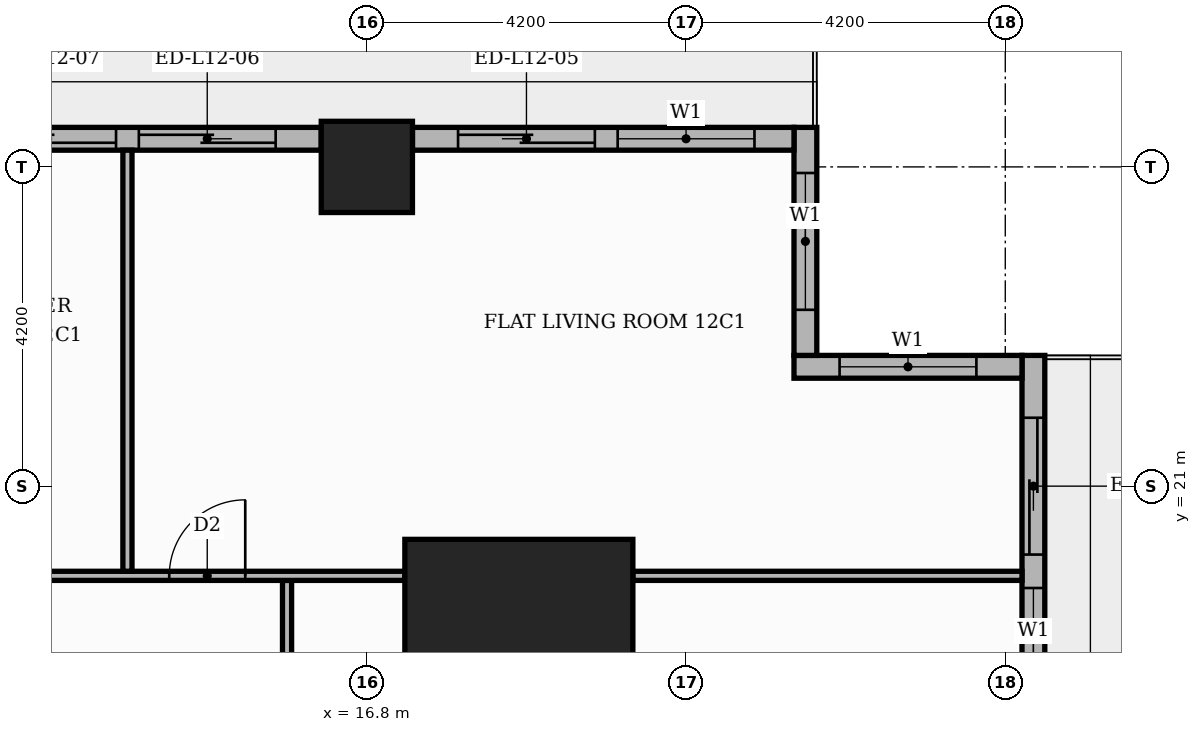
"""IFC4 building model, lengths in metres.
Left out: names, types, materials, properties, quantities, classifications, styles, units other than length and angle.
Written with IfcOpenShell. Run it as: python <this file> out.ifc"""

import sys

from ifc_helpers import new_model, si_unit, direction, frame, frame_2d, origin, origin_2d, place, context, subcontext, project, spatial, rectangle, extrude, element, fill, save


model = new_model("IFC4")
c1 = context("Model", 3, precision=1e-05, world=origin(), true_north=direction((0.0, 1.0)))
c2 = subcontext(c1, "Body", "Model", "MODEL_VIEW")
j1 = project(units=[si_unit("LENGTHUNIT", "METRE"), si_unit("PLANEANGLEUNIT", "RADIAN")], contexts=[c1])
p1 = place(None, origin())
s1 = spatial("IfcSite", under=j1, at=p1, CompositionType="ELEMENT")
p2 = place(p1, origin())
s2 = spatial("IfcBuilding", under=s1, at=p2, CompositionType="ELEMENT")
p3 = place(p2, frame((0.0, 0.0, 54.3)))
s3 = spatial("IfcBuildingStorey", under=s2, at=p3, CompositionType="ELEMENT", Elevation=54.3)
p4 = place(p3, frame((18.8, 18.8, 0.0), z_axis=(0.0, 0.0, 1.0), x_axis=(1.0, 0.0, 0.0)))
e1 = element("IfcColumn", 1, at=p4, inside=s3, PredefinedType="COLUMN", context=c2, shape_type="SweptSolid", body=[
    extrude(rectangle(XDim=3.0, YDim=3.0, at=origin_2d()), origin(), (0.0, 0.0, 1.0), 3.9),
])
p5 = place(p3, frame((16.8, 25.2, 0.0), z_axis=(0.0, 0.0, 1.0), x_axis=(1.0, 0.0, 0.0)))
e2 = element("IfcColumn", 2, at=p5, inside=s3, PredefinedType="COLUMN", context=c2, shape_type="SweptSolid", body=[
    extrude(rectangle(XDim=1.2, YDim=1.2, at=origin_2d()), origin(), (0.0, 0.0, 1.0), 3.9),
])
p6 = place(p3, frame((25.57, 17.4, 0.0), z_axis=(0.0, 0.0, 1.0), x_axis=(0.0, 1.0, 0.0)))
e3 = element("IfcWall", 3, at=p6, inside=s3, PredefinedType="STANDARD", context=c2, shape_type="SweptSolid", body=[
    extrude(rectangle(XDim=5.32, YDim=0.3, at=frame_2d((2.66, 0.0))), origin(), (0.0, 0.0, 1.0), 3.48),
])
p7 = place(p6, frame((2.7, 0.0, 0.0)))
e4 = element("IfcOpeningElement", 4, at=p7, cuts=e3, PredefinedType="OPENING", context=c2, shape_type="SweptSolid", body=[
    extrude(rectangle(XDim=1.8, YDim=2.4, at=frame_2d((0.9, 1.2))), frame((0.0, 0.16, 0.0), z_axis=(0.0, -1.0, 0.0), x_axis=(1.0, 0.0, 0.0)), (0.0, 0.0, 1.0), 0.32),
])
p8 = place(p6, frame((0.46, 0.0, 0.9)))
e5 = element("IfcOpeningElement", 5, at=p8, cuts=e3, PredefinedType="OPENING", context=c2, shape_type="SweptSolid", body=[
    extrude(rectangle(XDim=1.8, YDim=2.1, at=frame_2d((0.9, 1.05))), frame((0.0, 0.16, 0.0), z_axis=(0.0, -1.0, 0.0), x_axis=(1.0, 0.0, 0.0)), (0.0, 0.0, 1.0), 0.32),
])
p9 = place(p3, frame((25.42, 22.57, 0.0), z_axis=(0.0, 0.0, 1.0), x_axis=(-1.0, 0.0, 0.0)))
e6 = element("IfcWall", 6, at=p9, inside=s3, PredefinedType="STANDARD", context=c2, shape_type="SweptSolid", body=[
    extrude(rectangle(XDim=3.0, YDim=0.3, at=frame_2d((1.5, 0.0))), origin(), (0.0, 0.0, 1.0), 3.48),
])
p10 = place(p9, frame((0.6, 0.0, 0.9)))
e7 = element("IfcOpeningElement", 7, at=p10, cuts=e6, PredefinedType="OPENING", context=c2, shape_type="SweptSolid", body=[
    extrude(rectangle(XDim=1.8, YDim=2.1, at=frame_2d((0.9, 1.05))), frame((0.0, 0.16, 0.0), z_axis=(0.0, -1.0, 0.0), x_axis=(1.0, 0.0, 0.0)), (0.0, 0.0, 1.0), 0.32),
])
p11 = place(p3, frame((22.57, 22.72, 0.0), z_axis=(0.0, 0.0, 1.0), x_axis=(0.0, 1.0, 0.0)))
e8 = element("IfcWall", 8, at=p11, inside=s3, PredefinedType="STANDARD", context=c2, shape_type="SweptSolid", body=[
    extrude(rectangle(XDim=3.0, YDim=0.3, at=frame_2d((1.5, 0.0))), origin(), (0.0, 0.0, 1.0), 3.48),
])
p12 = place(p11, frame((0.6, 0.0, 0.9)))
e9 = element("IfcOpeningElement", 9, at=p12, cuts=e8, PredefinedType="OPENING", context=c2, shape_type="SweptSolid", body=[
    extrude(rectangle(XDim=1.8, YDim=2.1, at=frame_2d((0.9, 1.05))), frame((0.0, 0.16, 0.0), z_axis=(0.0, -1.0, 0.0), x_axis=(1.0, 0.0, 0.0)), (0.0, 0.0, 1.0), 0.32),
])
p13 = place(p3, frame((22.42, 25.57, 0.0), z_axis=(0.0, 0.0, 1.0), x_axis=(-1.0, 0.0, 0.0)))
e10 = element("IfcWall", 10, at=p13, inside=s3, PredefinedType="STANDARD", context=c2, shape_type="SweptSolid", body=[
    extrude(rectangle(XDim=5.02, YDim=0.3, at=frame_2d((2.51, 0.0))), origin(), (0.0, 0.0, 1.0), 3.48),
])
p14 = place(p13, frame((0.52, 0.0, 0.9)))
e11 = element("IfcOpeningElement", 11, at=p14, cuts=e10, PredefinedType="OPENING", context=c2, shape_type="SweptSolid", body=[
    extrude(rectangle(XDim=1.8, YDim=2.1, at=frame_2d((0.9, 1.05))), frame((0.0, 0.16, 0.0), z_axis=(0.0, -1.0, 0.0), x_axis=(1.0, 0.0, 0.0)), (0.0, 0.0, 1.0), 0.32),
])
p15 = place(p13, frame((2.62, 0.0, 0.0)))
e12 = element("IfcOpeningElement", 12, at=p15, cuts=e10, PredefinedType="OPENING", context=c2, shape_type="SweptSolid", body=[
    extrude(rectangle(XDim=1.8, YDim=2.4, at=frame_2d((0.9, 1.2))), frame((0.0, 0.16, 0.0), z_axis=(0.0, -1.0, 0.0), x_axis=(1.0, 0.0, 0.0)), (0.0, 0.0, 1.0), 0.32),
])
p16 = place(p3, frame((16.2, 25.57, 0.0), z_axis=(0.0, 0.0, 1.0), x_axis=(-1.0, 0.0, 0.0)))
e13 = element("IfcWall", 13, at=p16, inside=s3, PredefinedType="STANDARD", context=c2, shape_type="SweptSolid", body=[
    extrude(rectangle(XDim=7.2, YDim=0.3, at=frame_2d((3.6, 0.0))), origin(), (0.0, 0.0, 1.0), 3.48),
])
p17 = place(p16, frame((0.6, 0.0, 0.0)))
e14 = element("IfcOpeningElement", 14, at=p17, cuts=e13, PredefinedType="OPENING", context=c2, shape_type="SweptSolid", body=[
    extrude(rectangle(XDim=1.8, YDim=2.4, at=frame_2d((0.9, 1.2))), frame((0.0, 0.16, 0.0), z_axis=(0.0, -1.0, 0.0), x_axis=(1.0, 0.0, 0.0)), (0.0, 0.0, 1.0), 0.32),
])
p18 = place(p16, frame((2.7, 0.0, 0.0)))
e15 = element("IfcOpeningElement", 15, at=p18, cuts=e13, PredefinedType="OPENING", context=c2, shape_type="SweptSolid", body=[
    extrude(rectangle(XDim=1.8, YDim=2.4, at=frame_2d((0.9, 1.2))), frame((0.0, 0.16, 0.0), z_axis=(0.0, -1.0, 0.0), x_axis=(1.0, 0.0, 0.0)), (0.0, 0.0, 1.0), 0.32),
])
p19 = place(p16, frame((4.8, 0.0, 0.9)))
e16 = element("IfcOpeningElement", 16, at=p19, cuts=e13, PredefinedType="OPENING", context=c2, shape_type="SweptSolid", body=[
    extrude(rectangle(XDim=1.8, YDim=2.1, at=frame_2d((0.9, 1.05))), frame((0.0, 0.16, 0.0), z_axis=(0.0, -1.0, 0.0), x_axis=(1.0, 0.0, 0.0)), (0.0, 0.0, 1.0), 0.32),
])
p20 = place(p3, frame((15.75, 13.75, 0.0), z_axis=(0.0, 0.0, 1.0), x_axis=(0.0, 1.0, 0.0)))
e17 = element("IfcWall", 17, at=p20, inside=s3, PredefinedType="PARTITIONING", context=c2, shape_type="SweptSolid", body=[
    extrude(rectangle(XDim=6.01, YDim=0.12, at=frame_2d((3.005, 0.0))), origin(), (0.0, 0.0, 1.0), 3.48),
])
p21 = place(p20, frame((2.485, 0.0, 0.0)))
e18 = element("IfcOpeningElement", 18, at=p21, cuts=e17, PredefinedType="OPENING", context=c2, shape_type="SweptSolid", body=[
    extrude(rectangle(XDim=1.0, YDim=2.1, at=frame_2d((0.5, 1.05))), frame((0.0, 0.07, 0.0), z_axis=(0.0, -1.0, 0.0), x_axis=(1.0, 0.0, 0.0)), (0.0, 0.0, 1.0), 0.14),
])
p22 = place(p3, frame((5.35, 19.82, 0.0), z_axis=(0.0, 0.0, 1.0), x_axis=(1.0, 0.0, 0.0)))
e19 = element("IfcWall", 19, at=p22, inside=s3, PredefinedType="PARTITIONING", context=c2, shape_type="SweptSolid", body=[
    extrude(rectangle(XDim=11.95, YDim=0.12, at=frame_2d((5.975, 0.0))), origin(), (0.0, 0.0, 1.0), 3.48),
])
p23 = place(p22, frame((8.85, 0.0, 0.0)))
e20 = element("IfcOpeningElement", 20, at=p23, cuts=e19, PredefinedType="OPENING", context=c2, shape_type="SweptSolid", body=[
    extrude(rectangle(XDim=1.0, YDim=2.1, at=frame_2d((0.5, 1.05))), frame((0.0, 0.07, 0.0), z_axis=(0.0, -1.0, 0.0), x_axis=(1.0, 0.0, 0.0)), (0.0, 0.0, 1.0), 0.14),
])
p24 = place(p22, frame((5.75, 0.0, 0.0)))
e21 = element("IfcOpeningElement", 21, at=p24, cuts=e19, PredefinedType="OPENING", context=c2, shape_type="SweptSolid", body=[
    extrude(rectangle(XDim=0.9, YDim=2.1, at=frame_2d((0.45, 1.05))), frame((0.0, 0.07, 0.0), z_axis=(0.0, -1.0, 0.0), x_axis=(1.0, 0.0, 0.0)), (0.0, 0.0, 1.0), 0.14),
])
p25 = place(p3, frame((20.3, 19.82, 0.0), z_axis=(0.0, 0.0, 1.0), x_axis=(1.0, 0.0, 0.0)))
e22 = element("IfcWall", 22, at=p25, inside=s3, PredefinedType="PARTITIONING", context=c2, shape_type="SweptSolid", body=[
    extrude(rectangle(XDim=5.12, YDim=0.12, at=frame_2d((2.56, 0.0))), origin(), (0.0, 0.0, 1.0), 3.48),
])
p26 = place(p3, frame((13.65, 19.88, 0.0), z_axis=(0.0, 0.0, 1.0), x_axis=(0.0, 1.0, 0.0)))
e23 = element("IfcWall", 23, at=p26, inside=s3, PredefinedType="PARTITIONING", context=c2, shape_type="SweptSolid", body=[
    extrude(rectangle(XDim=5.54, YDim=0.12, at=frame_2d((2.77, 0.0))), origin(), (0.0, 0.0, 1.0), 3.48),
])
p27 = place(p7, origin())
e24 = element("IfcDoor", 24, at=p27, inside=s3, OperationType="SLIDING_TO_LEFT", PredefinedType="DOOR", context=c2, shape_type="SweptSolid", body=[
    extrude(rectangle(XDim=1.8, YDim=2.4, at=frame_2d((0.9, 1.2))), frame((0.0, 0.025, 0.0), z_axis=(0.0, -1.0, 0.0), x_axis=(1.0, 0.0, 0.0)), (0.0, 0.0, 1.0), 0.05),
])
fill(e4, e24)
p28 = place(p8, origin())
e25 = element("IfcWindow", 25, at=p28, inside=s3, PartitioningType="SINGLE_PANEL", PredefinedType="WINDOW", context=c2, shape_type="SweptSolid", body=[
    extrude(rectangle(XDim=1.8, YDim=2.1, at=frame_2d((0.9, 1.05))), frame((0.0, 0.03, 0.0), z_axis=(0.0, -1.0, 0.0), x_axis=(1.0, 0.0, 0.0)), (0.0, 0.0, 1.0), 0.06),
])
fill(e5, e25)
p29 = place(p10, origin())
e26 = element("IfcWindow", 26, at=p29, inside=s3, PartitioningType="SINGLE_PANEL", PredefinedType="WINDOW", context=c2, shape_type="SweptSolid", body=[
    extrude(rectangle(XDim=1.8, YDim=2.1, at=frame_2d((0.9, 1.05))), frame((0.0, 0.03, 0.0), z_axis=(0.0, -1.0, 0.0), x_axis=(1.0, 0.0, 0.0)), (0.0, 0.0, 1.0), 0.06),
])
fill(e7, e26)
p30 = place(p12, origin())
e27 = element("IfcWindow", 27, at=p30, inside=s3, PartitioningType="SINGLE_PANEL", PredefinedType="WINDOW", context=c2, shape_type="SweptSolid", body=[
    extrude(rectangle(XDim=1.8, YDim=2.1, at=frame_2d((0.9, 1.05))), frame((0.0, 0.03, 0.0), z_axis=(0.0, -1.0, 0.0), x_axis=(1.0, 0.0, 0.0)), (0.0, 0.0, 1.0), 0.06),
])
fill(e9, e27)
p31 = place(p14, origin())
e28 = element("IfcWindow", 28, at=p31, inside=s3, PartitioningType="SINGLE_PANEL", PredefinedType="WINDOW", context=c2, shape_type="SweptSolid", body=[
    extrude(rectangle(XDim=1.8, YDim=2.1, at=frame_2d((0.9, 1.05))), frame((0.0, 0.03, 0.0), z_axis=(0.0, -1.0, 0.0), x_axis=(1.0, 0.0, 0.0)), (0.0, 0.0, 1.0), 0.06),
])
fill(e11, e28)
p32 = place(p15, origin())
e29 = element("IfcDoor", 29, at=p32, inside=s3, OperationType="SLIDING_TO_RIGHT", PredefinedType="DOOR", context=c2, shape_type="SweptSolid", body=[
    extrude(rectangle(XDim=1.8, YDim=2.4, at=frame_2d((0.9, 1.2))), frame((0.0, 0.025, 0.0), z_axis=(0.0, -1.0, 0.0), x_axis=(1.0, 0.0, 0.0)), (0.0, 0.0, 1.0), 0.05),
])
fill(e12, e29)
p33 = place(p17, origin())
e30 = element("IfcDoor", 30, at=p33, inside=s3, OperationType="SLIDING_TO_LEFT", PredefinedType="DOOR", context=c2, shape_type="SweptSolid", body=[
    extrude(rectangle(XDim=1.8, YDim=2.4, at=frame_2d((0.9, 1.2))), frame((0.0, 0.025, 0.0), z_axis=(0.0, -1.0, 0.0), x_axis=(1.0, 0.0, 0.0)), (0.0, 0.0, 1.0), 0.05),
])
fill(e14, e30)
p34 = place(p18, origin())
e31 = element("IfcDoor", 31, at=p34, inside=s3, OperationType="SLIDING_TO_RIGHT", PredefinedType="DOOR", context=c2, shape_type="SweptSolid", body=[
    extrude(rectangle(XDim=1.8, YDim=2.4, at=frame_2d((0.9, 1.2))), frame((0.0, 0.025, 0.0), z_axis=(0.0, -1.0, 0.0), x_axis=(1.0, 0.0, 0.0)), (0.0, 0.0, 1.0), 0.05),
])
fill(e15, e31)
p35 = place(p23, origin())
e32 = element("IfcDoor", 32, at=p35, inside=s3, OperationType="SINGLE_SWING_RIGHT", PredefinedType="DOOR", context=c2, shape_type="SweptSolid", body=[
    extrude(rectangle(XDim=1.0, YDim=2.1, at=frame_2d((0.5, 1.05))), frame((0.0, 0.025, 0.0), z_axis=(0.0, -1.0, 0.0), x_axis=(1.0, 0.0, 0.0)), (0.0, 0.0, 1.0), 0.05),
])
fill(e20, e32)
save(model, sys.argv[1])
